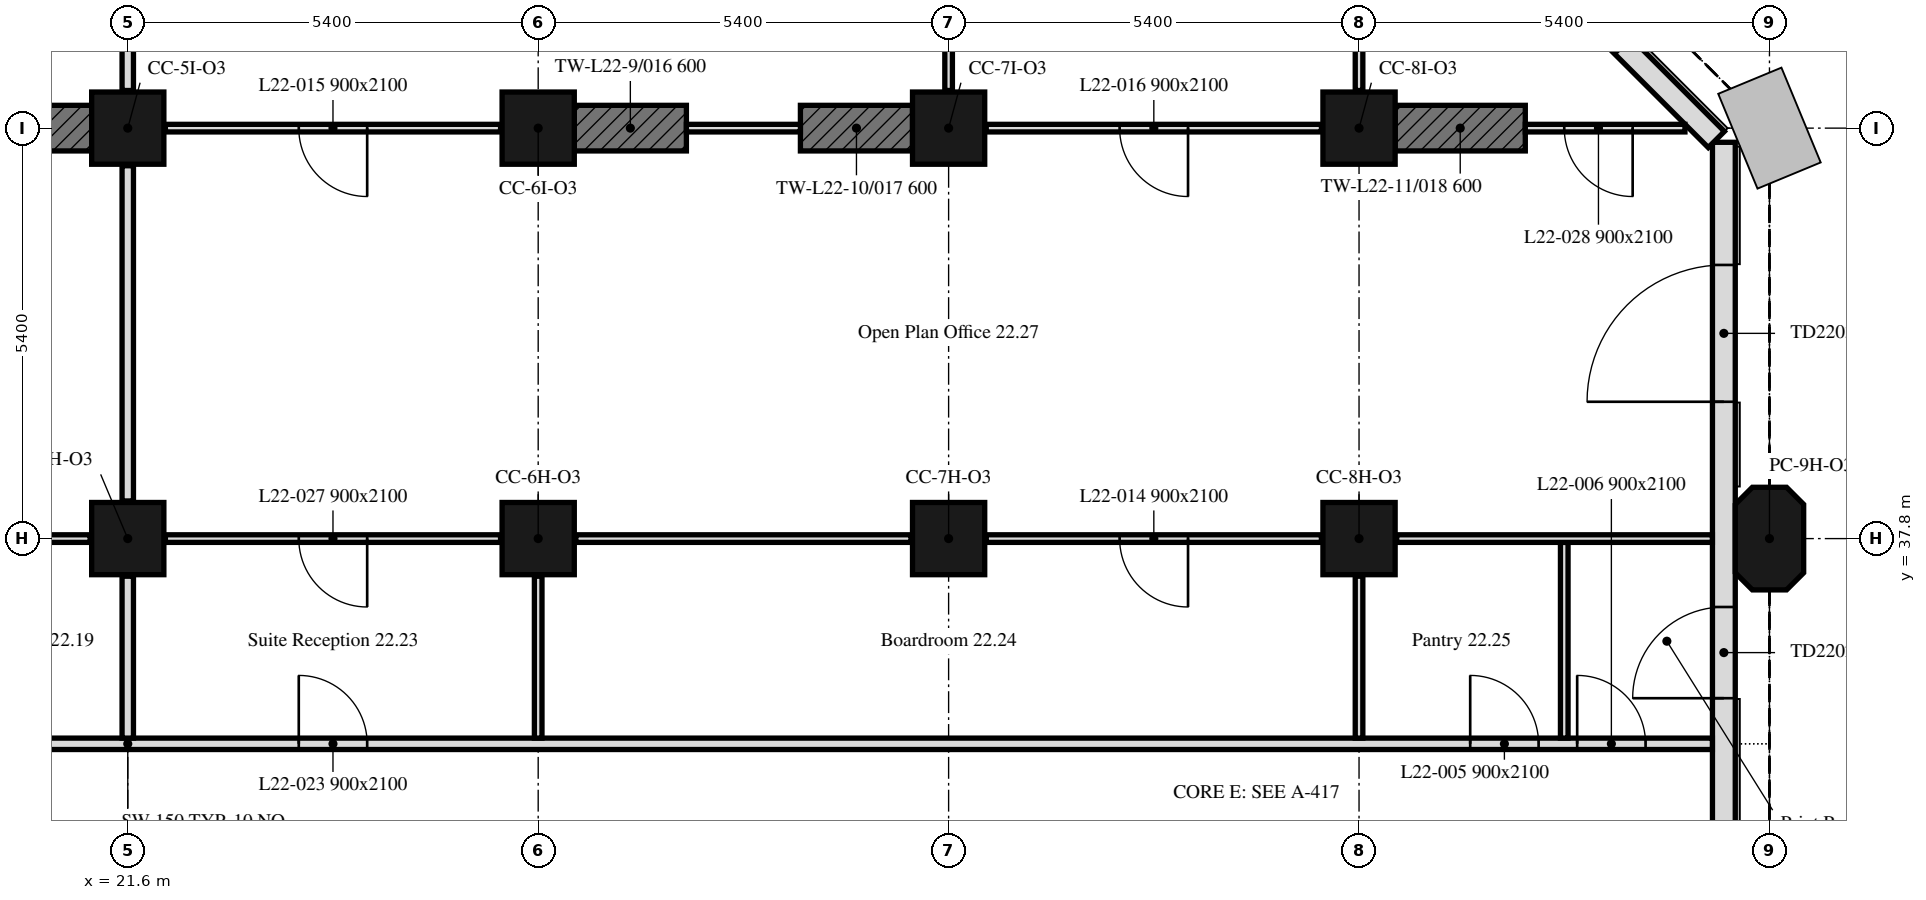
"""IFC4 building model, lengths in metres.
Left out: names, types, materials, properties, quantities, classifications, styles, units other than length and angle.
Written with IfcOpenShell. Run it as: python <this file> out.ifc"""

import sys

from ifc_helpers import new_model, si_unit, direction, frame, frame_2d, origin, origin_2d, place, context, subcontext, project, spatial, polyline, rectangle, outline, extrude, element, fill, save


model = new_model("IFC4")
c1 = context("Model", 3, precision=1e-05, world=origin(), true_north=direction((0.0, 1.0)))
c2 = subcontext(c1, "Body", "Model", "MODEL_VIEW")
j1 = project(units=[si_unit("LENGTHUNIT", "METRE"), si_unit("PLANEANGLEUNIT", "RADIAN")], contexts=[c1])
p1 = place(None, origin())
s1 = spatial("IfcSite", under=j1, at=p1, CompositionType="ELEMENT")
p2 = place(p1, origin())
s2 = spatial("IfcBuilding", under=s1, at=p2, CompositionType="ELEMENT")
p3 = place(p2, frame((0.0, 0.0, 95.4)))
s3 = spatial("IfcBuildingStorey", under=s2, at=p3, CompositionType="ELEMENT", Elevation=95.4)
for number, where, z_axis, x_axis in (
    (1, (21.6, 37.8, 0.0), (0.0, 0.0, 1.0), (1.0, 0.0, 0.0)),
    (2, (27.0, 37.8, 0.0), (0.0, 0.0, 1.0), (1.0, 0.0, 0.0)),
    (3, (32.4, 37.8, 0.0), (0.0, 0.0, 1.0), (1.0, 0.0, 0.0)),
    (4, (37.8, 37.8, 0.0), (0.0, 0.0, 1.0), (1.0, 0.0, 0.0)),
):
    element("IfcColumn", number, at=place(p3, frame(where, z_axis=z_axis, x_axis=x_axis)), inside=s3, PredefinedType="COLUMN", context=c2, shape_type="SweptSolid", body=[
        extrude(rectangle(XDim=0.95, YDim=0.95, at=origin_2d()), origin(), (0.0, 0.0, 1.0), 3.5),
    ])
p4 = place(p3, frame((43.2, 37.8, 0.0), z_axis=(0.0, 0.0, 1.0), x_axis=(0.0, 1.0, 0.0)))
e5 = element("IfcColumn", 5, at=p4, inside=s3, PredefinedType="COLUMN", context=c2, shape_type="SweptSolid", body=[
    extrude(outline(polyline([(-0.45, -0.45), (0.45, -0.45), (0.675, -0.225), (0.675, 0.225), (0.45, 0.45), (-0.45, 0.45), (-0.675, 0.225), (-0.675, -0.225), (-0.45, -0.45)])), origin(), (0.0, 0.0, 1.0), 3.5),
])
for number, where, z_axis, x_axis in (
    (6, (21.6, 43.2, 0.0), (0.0, 0.0, 1.0), (1.0, 0.0, 0.0)),
    (7, (27.0, 43.2, 0.0), (0.0, 0.0, 1.0), (1.0, 0.0, 0.0)),
    (8, (32.4, 43.2, 0.0), (0.0, 0.0, 1.0), (1.0, 0.0, 0.0)),
    (9, (37.8, 43.2, 0.0), (0.0, 0.0, 1.0), (1.0, 0.0, 0.0)),
):
    element("IfcColumn", number, at=place(p3, frame(where, z_axis=z_axis, x_axis=x_axis)), inside=s3, PredefinedType="COLUMN", context=c2, shape_type="SweptSolid", body=[
        extrude(rectangle(XDim=0.95, YDim=0.95, at=origin_2d()), origin(), (0.0, 0.0, 1.0), 3.5),
    ])
p5 = place(p3, frame((19.65, 43.2, 0.0), z_axis=(0.0, 0.0, 1.0), x_axis=(1.0, 0.0, 0.0)))
e10 = element("IfcWall", 10, at=p5, inside=s3, PredefinedType="SHEAR", context=c2, shape_type="SweptSolid", body=[
    extrude(rectangle(XDim=1.475, YDim=0.6, at=frame_2d((0.738, 0.0))), origin(), (0.0, 0.0, 1.0), 3.5),
])
p6 = place(p3, frame((27.475, 43.2, 0.0), z_axis=(0.0, 0.0, 1.0), x_axis=(1.0, 0.0, 0.0)))
e11 = element("IfcWall", 11, at=p6, inside=s3, PredefinedType="SHEAR", context=c2, shape_type="SweptSolid", body=[
    extrude(rectangle(XDim=1.475, YDim=0.6, at=frame_2d((0.737, 0.0))), origin(), (0.0, 0.0, 1.0), 3.5),
])
p7 = place(p3, frame((30.45, 43.2, 0.0), z_axis=(0.0, 0.0, 1.0), x_axis=(1.0, 0.0, 0.0)))
e12 = element("IfcWall", 12, at=p7, inside=s3, PredefinedType="SHEAR", context=c2, shape_type="SweptSolid", body=[
    extrude(rectangle(XDim=1.475, YDim=0.6, at=frame_2d((0.738, 0.0))), origin(), (0.0, 0.0, 1.0), 3.5),
])
p8 = place(p3, frame((38.275, 43.2, 0.0), z_axis=(0.0, 0.0, 1.0), x_axis=(1.0, 0.0, 0.0)))
e13 = element("IfcWall", 13, at=p8, inside=s3, PredefinedType="SHEAR", context=c2, shape_type="SweptSolid", body=[
    extrude(rectangle(XDim=1.713, YDim=0.6, at=frame_2d((0.856, 0.0))), origin(), (0.0, 0.0, 1.0), 3.5),
])
p9 = place(p3, frame((42.6, 32.4, 0.0), z_axis=(0.0, 0.0, 1.0), x_axis=(0.0, 1.0, 0.0)))
e14 = element("IfcWall", 14, at=p9, inside=s3, PredefinedType="SOLIDWALL", context=c2, shape_type="SweptSolid", body=[
    extrude(rectangle(XDim=10.614, YDim=0.3, at=frame_2d((5.307, 0.0))), origin(), (0.0, 0.0, 1.0), 3.5),
])
p10 = place(p9, frame((3.3, 0.0, 0.0)))
e15 = element("IfcOpeningElement", 15, at=p10, cuts=e14, PredefinedType="OPENING", context=c2, shape_type="SweptSolid", body=[
    extrude(rectangle(XDim=1.2, YDim=2.4, at=frame_2d((0.6, 1.2))), frame((0.0, 0.16, 0.0), z_axis=(0.0, -1.0, 0.0), x_axis=(1.0, 0.0, 0.0)), (0.0, 0.0, 1.0), 0.32),
])
p11 = place(p9, frame((7.2, 0.0, 0.0)))
e16 = element("IfcOpeningElement", 16, at=p11, cuts=e14, PredefinedType="OPENING", context=c2, shape_type="SweptSolid", body=[
    extrude(rectangle(XDim=1.8, YDim=2.4, at=frame_2d((0.9, 1.2))), frame((0.0, 0.16, 0.0), z_axis=(0.0, -1.0, 0.0), x_axis=(1.0, 0.0, 0.0)), (0.0, 0.0, 1.0), 0.32),
])
p12 = place(p3, frame((42.501, 43.051, 0.0), z_axis=(0.0, 0.0, 1.0), x_axis=(-0.707106781187, 0.707106781187, 0.0)))
e17 = element("IfcWall", 17, at=p12, inside=s3, PredefinedType="SOLIDWALL", context=c2, shape_type="SweptSolid", body=[
    extrude(rectangle(XDim=6.86, YDim=0.3, at=frame_2d((3.43, 0.0))), origin(), (0.0, 0.0, 1.0), 3.5),
])
p13 = place(p12, frame((1.73, 0.0, 0.9)))
e18 = element("IfcOpeningElement", 18, at=p13, cuts=e17, PredefinedType="OPENING", context=c2, shape_type="SweptSolid", body=[
    extrude(rectangle(XDim=3.4, YDim=1.7, at=frame_2d((1.7, 0.85))), frame((0.0, 0.16, 0.0), z_axis=(0.0, -1.0, 0.0), x_axis=(1.0, 0.0, 0.0)), (0.0, 0.0, 1.0), 0.32),
])
p14 = place(p3, frame((0.751, 35.1, 0.0), z_axis=(0.0, 0.0, 1.0), x_axis=(1.0, 0.0, 0.0)))
e19 = element("IfcWall", 19, at=p14, inside=s3, PredefinedType="PARTITIONING", context=c2, shape_type="SweptSolid", body=[
    extrude(rectangle(XDim=41.698, YDim=0.15, at=frame_2d((20.849, 0.0))), origin(), (0.0, 0.0, 1.0), 2.75),
])
p15 = place(p14, frame((6.279, 0.0, 0.0)))
e20 = element("IfcOpeningElement", 20, at=p15, cuts=e19, PredefinedType="OPENING", context=c2, shape_type="SweptSolid", body=[
    extrude(rectangle(XDim=0.9, YDim=2.1, at=frame_2d((0.45, 1.05))), frame((0.0, 0.075, 0.0), z_axis=(0.0, -1.0, 0.0), x_axis=(1.0, 0.0, 0.0)), (0.0, 0.0, 1.0), 0.15),
])
p16 = place(p14, frame((7.519, 0.0, 0.0)))
e21 = element("IfcOpeningElement", 21, at=p16, cuts=e19, PredefinedType="OPENING", context=c2, shape_type="SweptSolid", body=[
    extrude(rectangle(XDim=0.9, YDim=2.1, at=frame_2d((0.45, 1.05))), frame((0.0, 0.075, 0.0), z_axis=(0.0, -1.0, 0.0), x_axis=(1.0, 0.0, 0.0)), (0.0, 0.0, 1.0), 0.15),
])
p17 = place(p14, frame((17.079, 0.0, 0.0)))
e22 = element("IfcOpeningElement", 22, at=p17, cuts=e19, PredefinedType="OPENING", context=c2, shape_type="SweptSolid", body=[
    extrude(rectangle(XDim=0.9, YDim=2.1, at=frame_2d((0.45, 1.05))), frame((0.0, 0.075, 0.0), z_axis=(0.0, -1.0, 0.0), x_axis=(1.0, 0.0, 0.0)), (0.0, 0.0, 1.0), 0.15),
])
p18 = place(p14, frame((18.319, 0.0, 0.0)))
e23 = element("IfcOpeningElement", 23, at=p18, cuts=e19, PredefinedType="OPENING", context=c2, shape_type="SweptSolid", body=[
    extrude(rectangle(XDim=0.9, YDim=2.1, at=frame_2d((0.45, 1.05))), frame((0.0, 0.075, 0.0), z_axis=(0.0, -1.0, 0.0), x_axis=(1.0, 0.0, 0.0)), (0.0, 0.0, 1.0), 0.15),
])
p19 = place(p14, frame((38.511, 0.0, 0.0)))
e24 = element("IfcOpeningElement", 24, at=p19, cuts=e19, PredefinedType="OPENING", context=c2, shape_type="SweptSolid", body=[
    extrude(rectangle(XDim=0.9, YDim=2.1, at=frame_2d((0.45, 1.05))), frame((0.0, 0.075, 0.0), z_axis=(0.0, -1.0, 0.0), x_axis=(1.0, 0.0, 0.0)), (0.0, 0.0, 1.0), 0.15),
])
p20 = place(p14, frame((39.919, 0.0, 0.0)))
e25 = element("IfcOpeningElement", 25, at=p20, cuts=e19, PredefinedType="OPENING", context=c2, shape_type="SweptSolid", body=[
    extrude(rectangle(XDim=0.9, YDim=2.1, at=frame_2d((0.45, 1.05))), frame((0.0, 0.075, 0.0), z_axis=(0.0, -1.0, 0.0), x_axis=(1.0, 0.0, 0.0)), (0.0, 0.0, 1.0), 0.15),
])
p21 = place(p14, frame((2.174, 0.0, 0.0)))
e26 = element("IfcOpeningElement", 26, at=p21, cuts=e19, PredefinedType="OPENING", context=c2, shape_type="SweptSolid", body=[
    extrude(rectangle(XDim=0.9, YDim=2.1, at=frame_2d((0.45, 1.05))), frame((0.0, 0.075, 0.0), z_axis=(0.0, -1.0, 0.0), x_axis=(1.0, 0.0, 0.0)), (0.0, 0.0, 1.0), 0.15),
])
p22 = place(p14, frame((12.299, 0.0, 0.0)))
e27 = element("IfcOpeningElement", 27, at=p22, cuts=e19, PredefinedType="OPENING", context=c2, shape_type="SweptSolid", body=[
    extrude(rectangle(XDim=0.9, YDim=2.1, at=frame_2d((0.45, 1.05))), frame((0.0, 0.075, 0.0), z_axis=(0.0, -1.0, 0.0), x_axis=(1.0, 0.0, 0.0)), (0.0, 0.0, 1.0), 0.15),
])
p23 = place(p14, frame((23.099, 0.0, 0.0)))
e28 = element("IfcOpeningElement", 28, at=p23, cuts=e19, PredefinedType="OPENING", context=c2, shape_type="SweptSolid", body=[
    extrude(rectangle(XDim=0.9, YDim=2.1, at=frame_2d((0.45, 1.05))), frame((0.0, 0.075, 0.0), z_axis=(0.0, -1.0, 0.0), x_axis=(1.0, 0.0, 0.0)), (0.0, 0.0, 1.0), 0.15),
])
p24 = place(p3, frame((21.6, 35.175, 0.0), z_axis=(0.0, 0.0, 1.0), x_axis=(0.0, 1.0, 0.0)))
e29 = element("IfcWall", 29, at=p24, inside=s3, PredefinedType="PARTITIONING", context=c2, shape_type="SweptSolid", body=[
    extrude(rectangle(XDim=2.13, YDim=0.15, at=frame_2d((1.065, 0.0))), origin(), (0.0, 0.0, 1.0), 2.75),
])
p25 = place(p3, frame((21.105, 37.8, 0.0), z_axis=(0.0, 0.0, 1.0), x_axis=(-1.0, 0.0, 0.0)))
e30 = element("IfcWall", 30, at=p25, inside=s3, PredefinedType="PARTITIONING", context=c2, shape_type="SweptSolid", body=[
    extrude(rectangle(XDim=4.41, YDim=0.1, at=frame_2d((2.205, 0.0))), origin(), (0.0, 0.0, 1.0), 3.5),
])
p26 = place(p3, frame((21.6, 38.295, 0.0), z_axis=(0.0, 0.0, 1.0), x_axis=(0.0, 1.0, 0.0)))
e31 = element("IfcWall", 31, at=p26, inside=s3, PredefinedType="PARTITIONING", context=c2, shape_type="SweptSolid", body=[
    extrude(rectangle(XDim=4.41, YDim=0.15, at=frame_2d((2.205, 0.0))), origin(), (0.0, 0.0, 1.0), 2.75),
])
p27 = place(p3, frame((21.6, 47.849, 0.0), z_axis=(0.0, 0.0, 1.0), x_axis=(0.0, -1.0, 0.0)))
e32 = element("IfcWall", 32, at=p27, inside=s3, PredefinedType="PARTITIONING", context=c2, shape_type="SweptSolid", body=[
    extrude(rectangle(XDim=4.154, YDim=0.15, at=frame_2d((2.077, 0.0))), origin(), (0.0, 0.0, 1.0), 2.75),
])
p28 = place(p3, frame((27.0, 35.175, 0.0), z_axis=(0.0, 0.0, 1.0), x_axis=(0.0, 1.0, 0.0)))
e33 = element("IfcWall", 33, at=p28, inside=s3, PredefinedType="PARTITIONING", context=c2, shape_type="SweptSolid", body=[
    extrude(rectangle(XDim=2.13, YDim=0.1, at=frame_2d((1.065, 0.0))), origin(), (0.0, 0.0, 1.0), 2.75),
])
p29 = place(p3, frame((26.505, 37.8, 0.0), z_axis=(0.0, 0.0, 1.0), x_axis=(-1.0, 0.0, 0.0)))
e34 = element("IfcWall", 34, at=p29, inside=s3, PredefinedType="PARTITIONING", context=c2, shape_type="SweptSolid", body=[
    extrude(rectangle(XDim=4.41, YDim=0.1, at=frame_2d((2.205, 0.0))), origin(), (0.0, 0.0, 1.0), 3.5),
])
p30 = place(p29, frame((1.755, 0.0, 0.0)))
e35 = element("IfcOpeningElement", 35, at=p30, cuts=e34, PredefinedType="OPENING", context=c2, shape_type="SweptSolid", body=[
    extrude(rectangle(XDim=0.9, YDim=2.1, at=frame_2d((0.45, 1.05))), frame((0.0, 0.05, 0.0), z_axis=(0.0, -1.0, 0.0), x_axis=(1.0, 0.0, 0.0)), (0.0, 0.0, 1.0), 0.1),
])
p31 = place(p3, frame((37.8, 35.175, 0.0), z_axis=(0.0, 0.0, 1.0), x_axis=(0.0, 1.0, 0.0)))
e36 = element("IfcWall", 36, at=p31, inside=s3, PredefinedType="PARTITIONING", context=c2, shape_type="SweptSolid", body=[
    extrude(rectangle(XDim=2.13, YDim=0.1, at=frame_2d((1.065, 0.0))), origin(), (0.0, 0.0, 1.0), 3.5),
])
p32 = place(p3, frame((37.305, 37.8, 0.0), z_axis=(0.0, 0.0, 1.0), x_axis=(-1.0, 0.0, 0.0)))
e37 = element("IfcWall", 37, at=p32, inside=s3, PredefinedType="PARTITIONING", context=c2, shape_type="SweptSolid", body=[
    extrude(rectangle(XDim=4.41, YDim=0.1, at=frame_2d((2.205, 0.0))), origin(), (0.0, 0.0, 1.0), 3.5),
])
p33 = place(p32, frame((1.755, 0.0, 0.0)))
e38 = element("IfcOpeningElement", 38, at=p33, cuts=e37, PredefinedType="OPENING", context=c2, shape_type="SweptSolid", body=[
    extrude(rectangle(XDim=0.9, YDim=2.1, at=frame_2d((0.45, 1.05))), frame((0.0, 0.05, 0.0), z_axis=(0.0, -1.0, 0.0), x_axis=(1.0, 0.0, 0.0)), (0.0, 0.0, 1.0), 0.1),
])
p34 = place(p3, frame((31.905, 37.8, 0.0), z_axis=(0.0, 0.0, 1.0), x_axis=(-1.0, 0.0, 0.0)))
e39 = element("IfcWall", 39, at=p34, inside=s3, PredefinedType="PARTITIONING", context=c2, shape_type="SweptSolid", body=[
    extrude(rectangle(XDim=4.41, YDim=0.1, at=frame_2d((2.205, 0.0))), origin(), (0.0, 0.0, 1.0), 3.5),
])
p35 = place(p3, frame((40.5, 35.175, 0.0), z_axis=(0.0, 0.0, 1.0), x_axis=(0.0, 1.0, 0.0)))
e40 = element("IfcWall", 40, at=p35, inside=s3, PredefinedType="PARTITIONING", context=c2, shape_type="SweptSolid", body=[
    extrude(rectangle(XDim=2.575, YDim=0.1, at=frame_2d((1.288, 0.0))), origin(), (0.0, 0.0, 1.0), 3.5),
])
p36 = place(p3, frame((42.449, 37.8, 0.0), z_axis=(0.0, 0.0, 1.0), x_axis=(-1.0, 0.0, 0.0)))
e41 = element("IfcWall", 41, at=p36, inside=s3, PredefinedType="PARTITIONING", context=c2, shape_type="SweptSolid", body=[
    extrude(rectangle(XDim=4.154, YDim=0.1, at=frame_2d((2.077, 0.0))), origin(), (0.0, 0.0, 1.0), 3.5),
])
p37 = place(p3, frame((42.088, 43.2, 0.0), z_axis=(0.0, 0.0, 1.0), x_axis=(-1.0, 0.0, 0.0)))
e42 = element("IfcWall", 42, at=p37, inside=s3, PredefinedType="PARTITIONING", context=c2, shape_type="SweptSolid", body=[
    extrude(rectangle(XDim=2.1, YDim=0.1, at=frame_2d((1.05, 0.0))), origin(), (0.0, 0.0, 1.0), 3.5),
])
p38 = place(p37, frame((0.688, 0.0, 0.0)))
e43 = element("IfcOpeningElement", 43, at=p38, cuts=e42, PredefinedType="OPENING", context=c2, shape_type="SweptSolid", body=[
    extrude(rectangle(XDim=0.9, YDim=2.1, at=frame_2d((0.45, 1.05))), frame((0.0, 0.05, 0.0), z_axis=(0.0, -1.0, 0.0), x_axis=(1.0, 0.0, 0.0)), (0.0, 0.0, 1.0), 0.1),
])
p39 = place(p3, frame((37.305, 43.2, 0.0), z_axis=(0.0, 0.0, 1.0), x_axis=(-1.0, 0.0, 0.0)))
e44 = element("IfcWall", 44, at=p39, inside=s3, PredefinedType="PARTITIONING", context=c2, shape_type="SweptSolid", body=[
    extrude(rectangle(XDim=4.41, YDim=0.1, at=frame_2d((2.205, 0.0))), origin(), (0.0, 0.0, 1.0), 3.5),
])
p40 = place(p39, frame((1.755, 0.0, 0.0)))
e45 = element("IfcOpeningElement", 45, at=p40, cuts=e44, PredefinedType="OPENING", context=c2, shape_type="SweptSolid", body=[
    extrude(rectangle(XDim=0.9, YDim=2.1, at=frame_2d((0.45, 1.05))), frame((0.0, 0.05, 0.0), z_axis=(0.0, -1.0, 0.0), x_axis=(1.0, 0.0, 0.0)), (0.0, 0.0, 1.0), 0.1),
])
p41 = place(p3, frame((30.45, 43.2, 0.0), z_axis=(0.0, 0.0, 1.0), x_axis=(-1.0, 0.0, 0.0)))
e46 = element("IfcWall", 46, at=p41, inside=s3, PredefinedType="PARTITIONING", context=c2, shape_type="SweptSolid", body=[
    extrude(rectangle(XDim=1.5, YDim=0.1, at=frame_2d((0.75, 0.0))), origin(), (0.0, 0.0, 1.0), 3.5),
])
p42 = place(p3, frame((26.505, 43.2, 0.0), z_axis=(0.0, 0.0, 1.0), x_axis=(-1.0, 0.0, 0.0)))
e47 = element("IfcWall", 47, at=p42, inside=s3, PredefinedType="PARTITIONING", context=c2, shape_type="SweptSolid", body=[
    extrude(rectangle(XDim=4.41, YDim=0.1, at=frame_2d((2.205, 0.0))), origin(), (0.0, 0.0, 1.0), 3.5),
])
p43 = place(p42, frame((1.755, 0.0, 0.0)))
e48 = element("IfcOpeningElement", 48, at=p43, cuts=e47, PredefinedType="OPENING", context=c2, shape_type="SweptSolid", body=[
    extrude(rectangle(XDim=0.9, YDim=2.1, at=frame_2d((0.45, 1.05))), frame((0.0, 0.05, 0.0), z_axis=(0.0, -1.0, 0.0), x_axis=(1.0, 0.0, 0.0)), (0.0, 0.0, 1.0), 0.1),
])
p44 = place(p3, frame((32.4, 47.849, 0.0), z_axis=(0.0, 0.0, 1.0), x_axis=(0.0, -1.0, 0.0)))
e49 = element("IfcWall", 49, at=p44, inside=s3, PredefinedType="PARTITIONING", context=c2, shape_type="SweptSolid", body=[
    extrude(rectangle(XDim=4.154, YDim=0.1, at=frame_2d((2.077, 0.0))), origin(), (0.0, 0.0, 1.0), 2.75),
])
p45 = place(p3, frame((37.8, 43.695, 0.0), z_axis=(0.0, 0.0, 1.0), x_axis=(0.0, 1.0, 0.0)))
e50 = element("IfcWall", 50, at=p45, inside=s3, PredefinedType="PARTITIONING", context=c2, shape_type="SweptSolid", body=[
    extrude(rectangle(XDim=3.793, YDim=0.1, at=frame_2d((1.896, 0.0))), origin(), (0.0, 0.0, 1.0), 3.5),
])
p46 = place(p10, origin())
e51 = element("IfcDoor", 51, at=p46, inside=s3, OperationType="SINGLE_SWING_LEFT", PredefinedType="DOOR", context=c2, shape_type="SweptSolid", body=[
    extrude(rectangle(XDim=1.2, YDim=2.4, at=frame_2d((0.6, 1.2))), frame((0.0, 0.025, 0.0), z_axis=(0.0, -1.0, 0.0), x_axis=(1.0, 0.0, 0.0)), (0.0, 0.0, 1.0), 0.05),
])
fill(e15, e51)
p47 = place(p11, origin())
e52 = element("IfcDoor", 52, at=p47, inside=s3, OperationType="DOUBLE_DOOR_DOUBLE_SWING", PredefinedType="DOOR", context=c2, shape_type="SweptSolid", body=[
    extrude(rectangle(XDim=1.8, YDim=2.4, at=frame_2d((0.9, 1.2))), frame((0.0, 0.025, 0.0), z_axis=(0.0, -1.0, 0.0), x_axis=(1.0, 0.0, 0.0)), (0.0, 0.0, 1.0), 0.05),
])
fill(e16, e52)
p48 = place(p19, origin())
e53 = element("IfcDoor", 53, at=p48, inside=s3, OperationType="SINGLE_SWING_RIGHT", PredefinedType="DOOR", context=c2, shape_type="SweptSolid", body=[
    extrude(rectangle(XDim=0.9, YDim=2.1, at=frame_2d((0.45, 1.05))), frame((0.0, 0.025, 0.0), z_axis=(0.0, -1.0, 0.0), x_axis=(1.0, 0.0, 0.0)), (0.0, 0.0, 1.0), 0.05),
])
fill(e24, e53)
p49 = place(p20, origin())
e54 = element("IfcDoor", 54, at=p49, inside=s3, OperationType="SINGLE_SWING_RIGHT", PredefinedType="DOOR", context=c2, shape_type="SweptSolid", body=[
    extrude(rectangle(XDim=0.9, YDim=2.1, at=frame_2d((0.45, 1.05))), frame((0.0, 0.025, 0.0), z_axis=(0.0, -1.0, 0.0), x_axis=(1.0, 0.0, 0.0)), (0.0, 0.0, 1.0), 0.05),
])
fill(e25, e54)
p50 = place(p33, origin())
e55 = element("IfcDoor", 55, at=p50, inside=s3, OperationType="SINGLE_SWING_LEFT", PredefinedType="DOOR", context=c2, shape_type="SweptSolid", body=[
    extrude(rectangle(XDim=0.9, YDim=2.1, at=frame_2d((0.45, 1.05))), frame((0.0, 0.025, 0.0), z_axis=(0.0, -1.0, 0.0), x_axis=(1.0, 0.0, 0.0)), (0.0, 0.0, 1.0), 0.05),
])
fill(e38, e55)
p51 = place(p43, origin())
e56 = element("IfcDoor", 56, at=p51, inside=s3, OperationType="SINGLE_SWING_LEFT", PredefinedType="DOOR", context=c2, shape_type="SweptSolid", body=[
    extrude(rectangle(XDim=0.9, YDim=2.1, at=frame_2d((0.45, 1.05))), frame((0.0, 0.025, 0.0), z_axis=(0.0, -1.0, 0.0), x_axis=(1.0, 0.0, 0.0)), (0.0, 0.0, 1.0), 0.05),
])
fill(e48, e56)
p52 = place(p40, origin())
e57 = element("IfcDoor", 57, at=p52, inside=s3, OperationType="SINGLE_SWING_LEFT", PredefinedType="DOOR", context=c2, shape_type="SweptSolid", body=[
    extrude(rectangle(XDim=0.9, YDim=2.1, at=frame_2d((0.45, 1.05))), frame((0.0, 0.025, 0.0), z_axis=(0.0, -1.0, 0.0), x_axis=(1.0, 0.0, 0.0)), (0.0, 0.0, 1.0), 0.05),
])
fill(e45, e57)
p53 = place(p23, origin())
e58 = element("IfcDoor", 58, at=p53, inside=s3, OperationType="SINGLE_SWING_RIGHT", PredefinedType="DOOR", context=c2, shape_type="SweptSolid", body=[
    extrude(rectangle(XDim=0.9, YDim=2.1, at=frame_2d((0.45, 1.05))), frame((0.0, 0.025, 0.0), z_axis=(0.0, -1.0, 0.0), x_axis=(1.0, 0.0, 0.0)), (0.0, 0.0, 1.0), 0.05),
])
fill(e28, e58)
p54 = place(p30, origin())
e59 = element("IfcDoor", 59, at=p54, inside=s3, OperationType="SINGLE_SWING_RIGHT", PredefinedType="DOOR", context=c2, shape_type="SweptSolid", body=[
    extrude(rectangle(XDim=0.9, YDim=2.1, at=frame_2d((0.45, 1.05))), frame((0.0, 0.025, 0.0), z_axis=(0.0, -1.0, 0.0), x_axis=(1.0, 0.0, 0.0)), (0.0, 0.0, 1.0), 0.05),
])
fill(e35, e59)
p55 = place(p38, origin())
e60 = element("IfcDoor", 60, at=p55, inside=s3, OperationType="SINGLE_SWING_LEFT", PredefinedType="DOOR", context=c2, shape_type="SweptSolid", body=[
    extrude(rectangle(XDim=0.9, YDim=2.1, at=frame_2d((0.45, 1.05))), frame((0.0, 0.025, 0.0), z_axis=(0.0, -1.0, 0.0), x_axis=(1.0, 0.0, 0.0)), (0.0, 0.0, 1.0), 0.05),
])
fill(e43, e60)
save(model, sys.argv[1])
